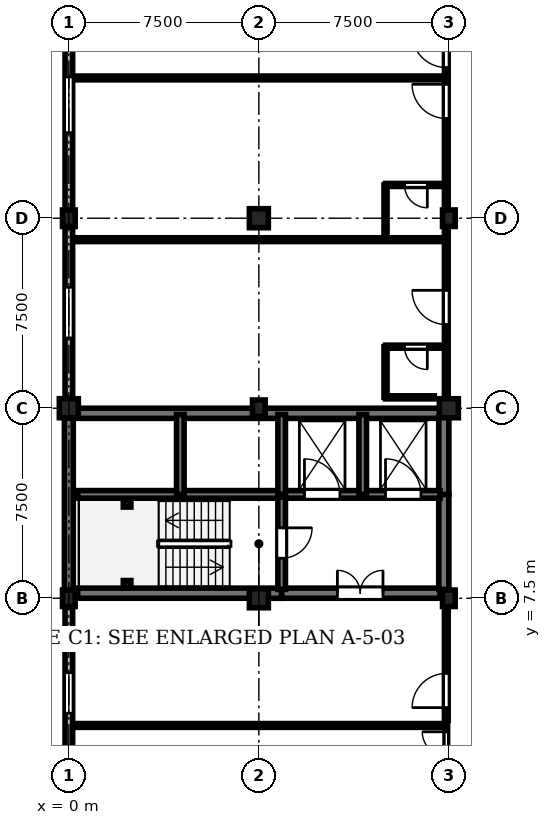
"""IFC4 building model, lengths in metres.
Left out: names, types, materials, properties, quantities, classifications, styles, units other than length and angle.
Written with IfcOpenShell. Run it as: python <this file> out.ifc"""

import sys

from ifc_helpers import new_model, si_unit, direction, frame, frame_2d, origin, origin_2d, place, context, subcontext, project, spatial, rectangle, i_section, extrude, element, fill, save


model = new_model("IFC4")
c1 = context("Model", 3, precision=1e-05, world=origin(), true_north=direction((0.0, 1.0)))
c2 = subcontext(c1, "Body", "Model", "MODEL_VIEW")
j1 = project(units=[si_unit("LENGTHUNIT", "METRE"), si_unit("PLANEANGLEUNIT", "RADIAN")], contexts=[c1])
p1 = place(None, origin())
s1 = spatial("IfcSite", under=j1, at=p1, CompositionType="ELEMENT")
p2 = place(p1, origin())
s2 = spatial("IfcBuilding", under=s1, at=p2, CompositionType="ELEMENT")
p3 = place(p2, frame((0.0, 0.0, 14.1)))
s3 = spatial("IfcBuildingStorey", under=s2, at=p3, CompositionType="ELEMENT", Elevation=14.1)
p4 = place(p3, frame((0.0, 7.5, 0.0), z_axis=(0.0, 0.0, 1.0), x_axis=(1.0, 0.0, 0.0)))
e1 = element("IfcColumn", 1, at=p4, inside=s3, PredefinedType="COLUMN", context=c2, shape_type="SweptSolid", body=[
    extrude(rectangle(XDim=0.5, YDim=0.65, at=origin_2d()), origin(), (0.0, 0.0, 1.0), 3.75),
])
p5 = place(p3, frame((0.0, 15.0, 0.0), z_axis=(0.0, 0.0, 1.0), x_axis=(1.0, 0.0, 0.0)))
e2 = element("IfcColumn", 2, at=p5, inside=s3, PredefinedType="COLUMN", context=c2, shape_type="SweptSolid", body=[
    extrude(rectangle(XDim=0.75, YDim=0.75, at=origin_2d()), origin(), (0.0, 0.0, 1.0), 3.75),
])
p6 = place(p3, frame((0.0, 22.5, 0.0), z_axis=(0.0, 0.0, 1.0), x_axis=(1.0, 0.0, 0.0)))
e3 = element("IfcColumn", 3, at=p6, inside=s3, PredefinedType="COLUMN", context=c2, shape_type="SweptSolid", body=[
    extrude(rectangle(XDim=0.5, YDim=0.65, at=origin_2d()), origin(), (0.0, 0.0, 1.0), 3.75),
])
p7 = place(p3, frame((7.5, 7.5, 0.0), z_axis=(0.0, 0.0, 1.0), x_axis=(1.0, 0.0, 0.0)))
e4 = element("IfcColumn", 4, at=p7, inside=s3, PredefinedType="COLUMN", context=c2, shape_type="SweptSolid", body=[
    extrude(rectangle(XDim=0.75, YDim=0.75, at=origin_2d()), origin(), (0.0, 0.0, 1.0), 3.75),
])
p8 = place(p3, frame((7.5, 15.0, 0.0), z_axis=(0.0, 0.0, 1.0), x_axis=(1.0, 0.0, 0.0)))
e5 = element("IfcColumn", 5, at=p8, inside=s3, PredefinedType="COLUMN", context=c2, shape_type="SweptSolid", body=[
    extrude(rectangle(XDim=0.5, YDim=0.65, at=origin_2d()), origin(), (0.0, 0.0, 1.0), 3.75),
])
p9 = place(p3, frame((7.5, 22.5, 0.0), z_axis=(0.0, 0.0, 1.0), x_axis=(1.0, 0.0, 0.0)))
e6 = element("IfcColumn", 6, at=p9, inside=s3, PredefinedType="COLUMN", context=c2, shape_type="SweptSolid", body=[
    extrude(rectangle(XDim=0.75, YDim=0.75, at=origin_2d()), origin(), (0.0, 0.0, 1.0), 3.75),
])
p10 = place(p3, frame((15.0, 7.5, 0.0), z_axis=(0.0, 0.0, 1.0), x_axis=(1.0, 0.0, 0.0)))
e7 = element("IfcColumn", 7, at=p10, inside=s3, PredefinedType="COLUMN", context=c2, shape_type="SweptSolid", body=[
    extrude(rectangle(XDim=0.5, YDim=0.65, at=origin_2d()), origin(), (0.0, 0.0, 1.0), 3.75),
])
p11 = place(p3, frame((15.0, 15.0, 0.0), z_axis=(0.0, 0.0, 1.0), x_axis=(1.0, 0.0, 0.0)))
e8 = element("IfcColumn", 8, at=p11, inside=s3, PredefinedType="COLUMN", context=c2, shape_type="SweptSolid", body=[
    extrude(rectangle(XDim=0.75, YDim=0.75, at=origin_2d()), origin(), (0.0, 0.0, 1.0), 3.75),
])
p12 = place(p3, frame((15.0, 22.5, 0.0), z_axis=(0.0, 0.0, 1.0), x_axis=(1.0, 0.0, 0.0)))
e9 = element("IfcColumn", 9, at=p12, inside=s3, PredefinedType="COLUMN", context=c2, shape_type="SweptSolid", body=[
    extrude(rectangle(XDim=0.5, YDim=0.65, at=origin_2d()), origin(), (0.0, 0.0, 1.0), 3.75),
])
for number, where, z_axis, x_axis in (
    (10, (2.3, 8.05, 0.0), (0.0, 0.0, 1.0), (1.0, 0.0, 0.0)),
    (11, (2.3, 11.25, 0.0), (0.0, 0.0, 1.0), (1.0, 0.0, 0.0)),
):
    element("IfcColumn", number, at=place(p3, frame(where, z_axis=z_axis, x_axis=x_axis)), inside=s3, PredefinedType="COLUMN", context=c2, shape_type="SweptSolid", body=[
        extrude(i_section(OverallWidth=0.3, OverallDepth=0.3, WebThickness=0.011, FlangeThickness=0.019, FilletRadius=0.027, at=origin_2d()), origin(), (0.0, 0.0, 1.0), 3.75),
    ])
p13 = place(p3, frame((0.0, 0.36, 0.0), z_axis=(0.0, 0.0, 1.0), x_axis=(0.0, 1.0, 0.0)))
e12 = element("IfcWall", 12, at=p13, inside=s3, PredefinedType="STANDARD", context=c2, shape_type="SweptSolid", body=[
    extrude(rectangle(XDim=6.805, YDim=0.3, at=frame_2d((3.402, 0.0))), origin(), (0.0, 0.0, 1.0), 2.87),
])
p14 = place(p13, frame((2.603, 0.0, 0.9)))
e13 = element("IfcOpeningElement", 13, at=p14, cuts=e12, PredefinedType="OPENING", context=c2, shape_type="SweptSolid", body=[
    extrude(rectangle(XDim=1.6, YDim=1.69, at=frame_2d((0.8, 0.845))), frame((0.0, 0.16, 0.0), z_axis=(0.0, -1.0, 0.0), x_axis=(1.0, 0.0, 0.0)), (0.0, 0.0, 1.0), 0.32),
])
p15 = place(p3, frame((0.0, 7.835, 0.0), z_axis=(0.0, 0.0, 1.0), x_axis=(0.0, 1.0, 0.0)))
e14 = element("IfcWall", 14, at=p15, inside=s3, PredefinedType="SHEAR", context=c2, shape_type="SweptSolid", body=[
    extrude(rectangle(XDim=6.78, YDim=0.35, at=frame_2d((3.39, 0.0))), origin(), (0.0, 0.0, 1.0), 3.47),
])
p16 = place(p3, frame((0.0, 15.385, 0.0), z_axis=(0.0, 0.0, 1.0), x_axis=(0.0, 1.0, 0.0)))
e15 = element("IfcWall", 15, at=p16, inside=s3, PredefinedType="STANDARD", context=c2, shape_type="SweptSolid", body=[
    extrude(rectangle(XDim=6.78, YDim=0.3, at=frame_2d((3.39, 0.0))), origin(), (0.0, 0.0, 1.0), 2.87),
])
p17 = place(p16, frame((2.39, 0.0, 0.9)))
e16 = element("IfcOpeningElement", 16, at=p17, cuts=e15, PredefinedType="OPENING", context=c2, shape_type="SweptSolid", body=[
    extrude(rectangle(XDim=2.0, YDim=1.69, at=frame_2d((1.0, 0.845))), frame((0.0, 0.16, 0.0), z_axis=(0.0, -1.0, 0.0), x_axis=(1.0, 0.0, 0.0)), (0.0, 0.0, 1.0), 0.32),
])
p18 = place(p3, frame((0.0, 22.835, 0.0), z_axis=(0.0, 0.0, 1.0), x_axis=(0.0, 1.0, 0.0)))
e17 = element("IfcWall", 17, at=p18, inside=s3, PredefinedType="STANDARD", context=c2, shape_type="SweptSolid", body=[
    extrude(rectangle(XDim=8.28, YDim=0.3, at=frame_2d((4.14, 0.0))), origin(), (0.0, 0.0, 1.0), 2.92),
])
p19 = place(p18, frame((3.04, 0.0, 0.9)))
e18 = element("IfcOpeningElement", 18, at=p19, cuts=e17, PredefinedType="OPENING", context=c2, shape_type="SweptSolid", body=[
    extrude(rectangle(XDim=2.2, YDim=1.74, at=frame_2d((1.1, 0.87))), frame((0.0, 0.16, 0.0), z_axis=(0.0, -1.0, 0.0), x_axis=(1.0, 0.0, 0.0)), (0.0, 0.0, 1.0), 0.32),
])
p20 = place(p3, frame((0.35, 7.7, 0.0), z_axis=(0.0, 0.0, 1.0), x_axis=(1.0, 0.0, 0.0)))
e19 = element("IfcWall", 19, at=p20, inside=s3, PredefinedType="SHEAR", context=c2, shape_type="SweptSolid", body=[
    extrude(rectangle(XDim=8.05, YDim=0.4, at=frame_2d((4.025, 0.0))), origin(), (0.0, 0.0, 1.0), 3.47),
])
p21 = place(p3, frame((8.4, 7.7, 0.0), z_axis=(0.0, 0.0, 1.0), x_axis=(1.0, 0.0, 0.0)))
e20 = element("IfcWall", 20, at=p21, inside=s3, PredefinedType="SHEAR", context=c2, shape_type="SweptSolid", body=[
    extrude(rectangle(XDim=6.25, YDim=0.4, at=frame_2d((3.125, 0.0))), origin(), (0.0, 0.0, 1.0), 3.47),
])
p22 = place(p21, frame((2.2, 0.0, 0.0)))
e21 = element("IfcOpeningElement", 21, at=p22, cuts=e20, PredefinedType="OPENING", context=c2, shape_type="SweptSolid", body=[
    extrude(rectangle(XDim=1.8, YDim=2.25, at=frame_2d((0.9, 1.125))), frame((0.0, 0.21, 0.0), z_axis=(0.0, -1.0, 0.0), x_axis=(1.0, 0.0, 0.0)), (0.0, 0.0, 1.0), 0.42),
])
p23 = place(p3, frame((0.35, 14.8, 0.0), z_axis=(0.0, 0.0, 1.0), x_axis=(1.0, 0.0, 0.0)))
e22 = element("IfcWall", 22, at=p23, inside=s3, PredefinedType="SHEAR", context=c2, shape_type="SweptSolid", body=[
    extrude(rectangle(XDim=14.3, YDim=0.4, at=frame_2d((7.15, 0.0))), origin(), (0.0, 0.0, 1.0), 3.47),
])
p24 = place(p3, frame((14.8, 7.85, 0.0), z_axis=(0.0, 0.0, 1.0), x_axis=(0.0, 1.0, 0.0)))
e23 = element("IfcWall", 23, at=p24, inside=s3, PredefinedType="SHEAR", context=c2, shape_type="SweptSolid", body=[
    extrude(rectangle(XDim=3.75, YDim=0.4, at=frame_2d((1.875, 0.0))), origin(), (0.0, 0.0, 1.0), 3.47),
])
p25 = place(p3, frame((14.8, 11.6, 0.0), z_axis=(0.0, 0.0, 1.0), x_axis=(0.0, 1.0, 0.0)))
e24 = element("IfcWall", 24, at=p25, inside=s3, PredefinedType="SHEAR", context=c2, shape_type="SweptSolid", body=[
    extrude(rectangle(XDim=3.05, YDim=0.4, at=frame_2d((1.525, 0.0))), origin(), (0.0, 0.0, 1.0), 3.47),
])
p26 = place(p3, frame((0.35, 11.6, 0.0), z_axis=(0.0, 0.0, 1.0), x_axis=(1.0, 0.0, 0.0)))
e25 = element("IfcWall", 25, at=p26, inside=s3, PredefinedType="SHEAR", context=c2, shape_type="SweptSolid", body=[
    extrude(rectangle(XDim=8.05, YDim=0.3, at=frame_2d((4.025, 0.0))), origin(), (0.0, 0.0, 1.0), 3.47),
])
p27 = place(p3, frame((8.4, 11.6, 0.0), z_axis=(0.0, 0.0, 1.0), x_axis=(1.0, 0.0, 0.0)))
e26 = element("IfcWall", 26, at=p27, inside=s3, PredefinedType="SHEAR", context=c2, shape_type="SweptSolid", body=[
    extrude(rectangle(XDim=6.25, YDim=0.3, at=frame_2d((3.125, 0.0))), origin(), (0.0, 0.0, 1.0), 3.47),
])
p28 = place(p27, frame((0.9, 0.0, 0.0)))
e27 = element("IfcOpeningElement", 27, at=p28, cuts=e26, PredefinedType="OPENING", context=c2, shape_type="SweptSolid", body=[
    extrude(rectangle(XDim=1.4, YDim=2.25, at=frame_2d((0.7, 1.125))), frame((0.0, 0.16, 0.0), z_axis=(0.0, -1.0, 0.0), x_axis=(1.0, 0.0, 0.0)), (0.0, 0.0, 1.0), 0.32),
])
p29 = place(p27, frame((4.1, 0.0, 0.0)))
e28 = element("IfcOpeningElement", 28, at=p29, cuts=e26, PredefinedType="OPENING", context=c2, shape_type="SweptSolid", body=[
    extrude(rectangle(XDim=1.4, YDim=2.25, at=frame_2d((0.7, 1.125))), frame((0.0, 0.16, 0.0), z_axis=(0.0, -1.0, 0.0), x_axis=(1.0, 0.0, 0.0)), (0.0, 0.0, 1.0), 0.32),
])
p30 = place(p3, frame((8.4, 11.5, 0.0), z_axis=(0.0, 0.0, 1.0), x_axis=(0.0, -1.0, 0.0)))
e29 = element("IfcWall", 29, at=p30, inside=s3, PredefinedType="SHEAR", context=c2, shape_type="SweptSolid", body=[
    extrude(rectangle(XDim=3.65, YDim=0.3, at=frame_2d((1.825, 0.0))), origin(), (0.0, 0.0, 1.0), 3.47),
])
p31 = place(p30, frame((1.22, 0.0, 0.0)))
e30 = element("IfcOpeningElement", 30, at=p31, cuts=e29, PredefinedType="OPENING", context=c2, shape_type="SweptSolid", body=[
    extrude(rectangle(XDim=1.2, YDim=2.25, at=frame_2d((0.6, 1.125))), frame((0.0, 0.16, 0.0), z_axis=(0.0, -1.0, 0.0), x_axis=(1.0, 0.0, 0.0)), (0.0, 0.0, 1.0), 0.32),
])
for number, where, z_axis, x_axis in (
    (31, (4.4, 11.6, 0.0), (0.0, 0.0, 1.0), (0.0, 1.0, 0.0)),
    (32, (8.4, 11.6, 0.0), (0.0, 0.0, 1.0), (0.0, 1.0, 0.0)),
    (33, (11.6, 11.6, 0.0), (0.0, 0.0, 1.0), (0.0, 1.0, 0.0)),
):
    element("IfcWall", number, at=place(p3, frame(where, z_axis=z_axis, x_axis=x_axis)), inside=s3, PredefinedType="SHEAR", context=c2, shape_type="SweptSolid", body=[
        extrude(rectangle(XDim=3.15, YDim=0.3, at=frame_2d((1.575, 0.0))), origin(), (0.0, 0.0, 1.0), 3.47),
    ])
p32 = place(p3, frame((14.9, 0.43, 0.0), z_axis=(0.0, 0.0, 1.0), x_axis=(0.0, 1.0, 0.0)))
e34 = element("IfcWall", 34, at=p32, inside=s3, PredefinedType="PARTITIONING", context=c2, shape_type="SweptSolid", body=[
    extrude(rectangle(XDim=2.05, YDim=0.1, at=frame_2d((1.025, 0.0))), origin(), (0.0, 0.0, 1.0), 2.905),
])
p33 = place(p32, frame((0.85, 0.0, 0.0)))
e35 = element("IfcOpeningElement", 35, at=p33, cuts=e34, PredefinedType="OPENING", context=c2, shape_type="SweptSolid", body=[
    extrude(rectangle(XDim=0.95, YDim=2.15, at=frame_2d((0.475, 1.075))), frame((0.0, 0.06, 0.0), z_axis=(0.0, -1.0, 0.0), x_axis=(1.0, 0.0, 0.0)), (0.0, 0.0, 1.0), 0.12),
])
p34 = place(p3, frame((14.9, 2.68, 0.0), z_axis=(0.0, 0.0, 1.0), x_axis=(0.0, 1.0, 0.0)))
e36 = element("IfcWall", 36, at=p34, inside=s3, PredefinedType="PARTITIONING", context=c2, shape_type="SweptSolid", body=[
    extrude(rectangle(XDim=4.39, YDim=0.15, at=frame_2d((2.195, 0.0))), origin(), (0.0, 0.0, 1.0), 2.905),
])
p35 = place(p34, frame((0.504, 0.0, 0.0)))
e37 = element("IfcOpeningElement", 37, at=p35, cuts=e36, PredefinedType="OPENING", context=c2, shape_type="SweptSolid", body=[
    extrude(rectangle(XDim=1.35, YDim=2.25, at=frame_2d((0.675, 1.125))), frame((0.0, 0.085, 0.0), z_axis=(0.0, -1.0, 0.0), x_axis=(1.0, 0.0, 0.0)), (0.0, 0.0, 1.0), 0.17),
])
p36 = place(p3, frame((14.9, 15.43, 0.0), z_axis=(0.0, 0.0, 1.0), x_axis=(0.0, 1.0, 0.0)))
e38 = element("IfcWall", 38, at=p36, inside=s3, PredefinedType="PARTITIONING", context=c2, shape_type="SweptSolid", body=[
    extrude(rectangle(XDim=6.223, YDim=0.15, at=frame_2d((3.112, 0.0))), origin(), (0.0, 0.0, 1.0), 2.905),
])
p37 = place(p36, frame((2.874, 0.0, 0.0)))
e39 = element("IfcOpeningElement", 39, at=p37, cuts=e38, PredefinedType="OPENING", context=c2, shape_type="SweptSolid", body=[
    extrude(rectangle(XDim=1.35, YDim=2.25, at=frame_2d((0.675, 1.125))), frame((0.0, 0.085, 0.0), z_axis=(0.0, -1.0, 0.0), x_axis=(1.0, 0.0, 0.0)), (0.0, 0.0, 1.0), 0.17),
])
p38 = place(p3, frame((14.9, 17.43, 0.0), z_axis=(0.0, 0.0, 1.0), x_axis=(-1.0, 0.0, 0.0)))
e40 = element("IfcWall", 40, at=p38, inside=s3, PredefinedType="PARTITIONING", context=c2, shape_type="SweptSolid", body=[
    extrude(rectangle(XDim=2.4, YDim=0.12, at=frame_2d((1.2, 0.0))), origin(), (0.0, 0.0, 1.0), 3.455),
])
p39 = place(p38, frame((0.75, 0.0, 0.0)))
e41 = element("IfcOpeningElement", 41, at=p39, cuts=e40, PredefinedType="OPENING", context=c2, shape_type="SweptSolid", body=[
    extrude(rectangle(XDim=0.9, YDim=2.1, at=frame_2d((0.45, 1.05))), frame((0.0, 0.07, 0.0), z_axis=(0.0, -1.0, 0.0), x_axis=(1.0, 0.0, 0.0)), (0.0, 0.0, 1.0), 0.14),
])
p40 = place(p3, frame((12.5, 15.43, 0.0), z_axis=(0.0, 0.0, 1.0), x_axis=(0.0, 1.0, 0.0)))
e42 = element("IfcWall", 42, at=p40, inside=s3, PredefinedType="PARTITIONING", context=c2, shape_type="SweptSolid", body=[
    extrude(rectangle(XDim=2.0, YDim=0.12, at=frame_2d((1.0, 0.0))), origin(), (0.0, 0.0, 1.0), 3.455),
])
p41 = place(p3, frame((14.9, 21.813, 0.0), z_axis=(0.0, 0.0, 1.0), x_axis=(0.0, 1.0, 0.0)))
e43 = element("IfcWall", 43, at=p41, inside=s3, PredefinedType="PARTITIONING", context=c2, shape_type="SweptSolid", body=[
    extrude(rectangle(XDim=6.223, YDim=0.15, at=frame_2d((3.112, 0.0))), origin(), (0.0, 0.0, 1.0), 2.755),
])
p42 = place(p41, frame((4.623, 0.0, 0.0)))
e44 = element("IfcOpeningElement", 44, at=p42, cuts=e43, PredefinedType="OPENING", context=c2, shape_type="SweptSolid", body=[
    extrude(rectangle(XDim=1.35, YDim=2.25, at=frame_2d((0.675, 1.125))), frame((0.0, 0.085, 0.0), z_axis=(0.0, -1.0, 0.0), x_axis=(1.0, 0.0, 0.0)), (0.0, 0.0, 1.0), 0.17),
])
p43 = place(p3, frame((14.9, 23.813, 0.0), z_axis=(0.0, 0.0, 1.0), x_axis=(-1.0, 0.0, 0.0)))
e45 = element("IfcWall", 45, at=p43, inside=s3, PredefinedType="PARTITIONING", context=c2, shape_type="SweptSolid", body=[
    extrude(rectangle(XDim=2.4, YDim=0.12, at=frame_2d((1.2, 0.0))), origin(), (0.0, 0.0, 1.0), 3.455),
])
p44 = place(p43, frame((0.75, 0.0, 0.0)))
e46 = element("IfcOpeningElement", 46, at=p44, cuts=e45, PredefinedType="OPENING", context=c2, shape_type="SweptSolid", body=[
    extrude(rectangle(XDim=0.9, YDim=2.1, at=frame_2d((0.45, 1.05))), frame((0.0, 0.07, 0.0), z_axis=(0.0, -1.0, 0.0), x_axis=(1.0, 0.0, 0.0)), (0.0, 0.0, 1.0), 0.14),
])
p45 = place(p3, frame((12.5, 21.813, 0.0), z_axis=(0.0, 0.0, 1.0), x_axis=(0.0, 1.0, 0.0)))
e47 = element("IfcWall", 47, at=p45, inside=s3, PredefinedType="PARTITIONING", context=c2, shape_type="SweptSolid", body=[
    extrude(rectangle(XDim=2.0, YDim=0.12, at=frame_2d((1.0, 0.0))), origin(), (0.0, 0.0, 1.0), 3.455),
])
p46 = place(p3, frame((14.9, 28.197, 0.0), z_axis=(0.0, 0.0, 1.0), x_axis=(0.0, 1.0, 0.0)))
e48 = element("IfcWall", 48, at=p46, inside=s3, PredefinedType="PARTITIONING", context=c2, shape_type="SweptSolid", body=[
    extrude(rectangle(XDim=6.223, YDim=0.15, at=frame_2d((3.112, 0.0))), origin(), (0.0, 0.0, 1.0), 2.755),
])
p47 = place(p46, frame((0.25, 0.0, 0.0)))
e49 = element("IfcOpeningElement", 49, at=p47, cuts=e48, PredefinedType="OPENING", context=c2, shape_type="SweptSolid", body=[
    extrude(rectangle(XDim=1.35, YDim=2.25, at=frame_2d((0.675, 1.125))), frame((0.0, 0.085, 0.0), z_axis=(0.0, -1.0, 0.0), x_axis=(1.0, 0.0, 0.0)), (0.0, 0.0, 1.0), 0.17),
])
for number, where, z_axis, x_axis in (
    (50, (0.35, 2.48, 0.0), (0.0, 0.0, 1.0), (1.0, 0.0, 0.0)),
    (51, (0.35, 21.653, 0.0), (0.0, 0.0, 1.0), (1.0, 0.0, 0.0)),
    (52, (0.35, 28.037, 0.0), (0.0, 0.0, 1.0), (1.0, 0.0, 0.0)),
):
    element("IfcWall", number, at=place(p3, frame(where, z_axis=z_axis, x_axis=x_axis)), inside=s3, PredefinedType="PARTITIONING", context=c2, shape_type="SweptSolid", body=[
        extrude(rectangle(XDim=14.55, YDim=0.15, at=frame_2d((7.275, 0.0))), origin(), (0.0, 0.0, 1.0), 3.455),
    ])
p48 = place(p3, frame((12.5, 15.43, 0.0), z_axis=(0.0, 0.0, 1.0), x_axis=(1.0, 0.0, 0.0)))
e53 = element("IfcWall", 53, at=p48, inside=s3, PredefinedType="PARTITIONING", context=c2, shape_type="SweptSolid", body=[
    extrude(rectangle(XDim=1.925, YDim=0.12, at=frame_2d((0.962, 0.0))), origin(), (0.0, 0.0, 1.0), 3.455),
])
p49 = place(p14, origin())
e54 = element("IfcWindow", 54, at=p49, inside=s3, PartitioningType="SINGLE_PANEL", PredefinedType="WINDOW", context=c2, shape_type="SweptSolid", body=[
    extrude(rectangle(XDim=1.6, YDim=1.69, at=frame_2d((0.8, 0.845))), frame((0.0, 0.03, 0.0), z_axis=(0.0, -1.0, 0.0), x_axis=(1.0, 0.0, 0.0)), (0.0, 0.0, 1.0), 0.06),
])
fill(e13, e54)
p50 = place(p17, origin())
e55 = element("IfcWindow", 55, at=p50, inside=s3, PartitioningType="SINGLE_PANEL", PredefinedType="WINDOW", context=c2, shape_type="SweptSolid", body=[
    extrude(rectangle(XDim=2.0, YDim=1.69, at=frame_2d((1.0, 0.845))), frame((0.0, 0.03, 0.0), z_axis=(0.0, -1.0, 0.0), x_axis=(1.0, 0.0, 0.0)), (0.0, 0.0, 1.0), 0.06),
])
fill(e16, e55)
p51 = place(p19, origin())
e56 = element("IfcWindow", 56, at=p51, inside=s3, PartitioningType="SINGLE_PANEL", PredefinedType="WINDOW", context=c2, shape_type="SweptSolid", body=[
    extrude(rectangle(XDim=2.2, YDim=1.74, at=frame_2d((1.1, 0.87))), frame((0.0, 0.03, 0.0), z_axis=(0.0, -1.0, 0.0), x_axis=(1.0, 0.0, 0.0)), (0.0, 0.0, 1.0), 0.06),
])
fill(e18, e56)
p52 = place(p22, origin())
e57 = element("IfcDoor", 57, at=p52, inside=s3, OperationType="DOUBLE_DOOR_SINGLE_SWING", PredefinedType="DOOR", context=c2, shape_type="SweptSolid", body=[
    extrude(rectangle(XDim=1.8, YDim=2.25, at=frame_2d((0.9, 1.125))), frame((0.0, 0.025, 0.0), z_axis=(0.0, -1.0, 0.0), x_axis=(1.0, 0.0, 0.0)), (0.0, 0.0, 1.0), 0.05),
])
fill(e21, e57)
p53 = place(p28, origin())
e58 = element("IfcDoor", 58, at=p53, inside=s3, OperationType="DOUBLE_DOOR_SLIDING", PredefinedType="DOOR", context=c2, shape_type="SweptSolid", body=[
    extrude(rectangle(XDim=1.4, YDim=2.25, at=frame_2d((0.7, 1.125))), frame((0.0, 0.025, 0.0), z_axis=(0.0, -1.0, 0.0), x_axis=(1.0, 0.0, 0.0)), (0.0, 0.0, 1.0), 0.05),
])
fill(e27, e58)
p54 = place(p29, origin())
e59 = element("IfcDoor", 59, at=p54, inside=s3, OperationType="DOUBLE_DOOR_SLIDING", PredefinedType="DOOR", context=c2, shape_type="SweptSolid", body=[
    extrude(rectangle(XDim=1.4, YDim=2.25, at=frame_2d((0.7, 1.125))), frame((0.0, 0.025, 0.0), z_axis=(0.0, -1.0, 0.0), x_axis=(1.0, 0.0, 0.0)), (0.0, 0.0, 1.0), 0.05),
])
fill(e28, e59)
p55 = place(p31, origin())
e60 = element("IfcDoor", 60, at=p55, inside=s3, OperationType="SINGLE_SWING_LEFT", PredefinedType="DOOR", context=c2, shape_type="SweptSolid", body=[
    extrude(rectangle(XDim=1.2, YDim=2.25, at=frame_2d((0.6, 1.125))), frame((0.0, 0.025, 0.0), z_axis=(0.0, -1.0, 0.0), x_axis=(1.0, 0.0, 0.0)), (0.0, 0.0, 1.0), 0.05),
])
fill(e30, e60)
p56 = place(p33, origin())
e61 = element("IfcDoor", 61, at=p56, inside=s3, OperationType="SINGLE_SWING_RIGHT", PredefinedType="DOOR", context=c2, shape_type="SweptSolid", body=[
    extrude(rectangle(XDim=0.95, YDim=2.15, at=frame_2d((0.475, 1.075))), frame((0.0, 0.025, 0.0), z_axis=(0.0, -1.0, 0.0), x_axis=(1.0, 0.0, 0.0)), (0.0, 0.0, 1.0), 0.05),
])
fill(e35, e61)
p57 = place(p35, origin())
e62 = element("IfcDoor", 62, at=p57, inside=s3, OperationType="SINGLE_SWING_LEFT", PredefinedType="DOOR", context=c2, shape_type="SweptSolid", body=[
    extrude(rectangle(XDim=1.35, YDim=2.25, at=frame_2d((0.675, 1.125))), frame((0.0, 0.025, 0.0), z_axis=(0.0, -1.0, 0.0), x_axis=(1.0, 0.0, 0.0)), (0.0, 0.0, 1.0), 0.05),
])
fill(e37, e62)
p58 = place(p37, origin())
e63 = element("IfcDoor", 63, at=p58, inside=s3, OperationType="SINGLE_SWING_RIGHT", PredefinedType="DOOR", context=c2, shape_type="SweptSolid", body=[
    extrude(rectangle(XDim=1.35, YDim=2.25, at=frame_2d((0.675, 1.125))), frame((0.0, 0.025, 0.0), z_axis=(0.0, -1.0, 0.0), x_axis=(1.0, 0.0, 0.0)), (0.0, 0.0, 1.0), 0.05),
])
fill(e39, e63)
p59 = place(p39, origin())
e64 = element("IfcDoor", 64, at=p59, inside=s3, OperationType="SINGLE_SWING_LEFT", PredefinedType="DOOR", context=c2, shape_type="SweptSolid", body=[
    extrude(rectangle(XDim=0.9, YDim=2.1, at=frame_2d((0.45, 1.05))), frame((0.0, 0.025, 0.0), z_axis=(0.0, -1.0, 0.0), x_axis=(1.0, 0.0, 0.0)), (0.0, 0.0, 1.0), 0.05),
])
fill(e41, e64)
p60 = place(p42, origin())
e65 = element("IfcDoor", 65, at=p60, inside=s3, OperationType="SINGLE_SWING_RIGHT", PredefinedType="DOOR", context=c2, shape_type="SweptSolid", body=[
    extrude(rectangle(XDim=1.35, YDim=2.25, at=frame_2d((0.675, 1.125))), frame((0.0, 0.025, 0.0), z_axis=(0.0, -1.0, 0.0), x_axis=(1.0, 0.0, 0.0)), (0.0, 0.0, 1.0), 0.05),
])
fill(e44, e65)
p61 = place(p44, origin())
e66 = element("IfcDoor", 66, at=p61, inside=s3, OperationType="SINGLE_SWING_LEFT", PredefinedType="DOOR", context=c2, shape_type="SweptSolid", body=[
    extrude(rectangle(XDim=0.9, YDim=2.1, at=frame_2d((0.45, 1.05))), frame((0.0, 0.025, 0.0), z_axis=(0.0, -1.0, 0.0), x_axis=(1.0, 0.0, 0.0)), (0.0, 0.0, 1.0), 0.05),
])
fill(e46, e66)
p62 = place(p47, origin())
e67 = element("IfcDoor", 67, at=p62, inside=s3, OperationType="SINGLE_SWING_RIGHT", PredefinedType="DOOR", context=c2, shape_type="SweptSolid", body=[
    extrude(rectangle(XDim=1.35, YDim=2.25, at=frame_2d((0.675, 1.125))), frame((0.0, 0.025, 0.0), z_axis=(0.0, -1.0, 0.0), x_axis=(1.0, 0.0, 0.0)), (0.0, 0.0, 1.0), 0.05),
])
fill(e49, e67)
save(model, sys.argv[1])
